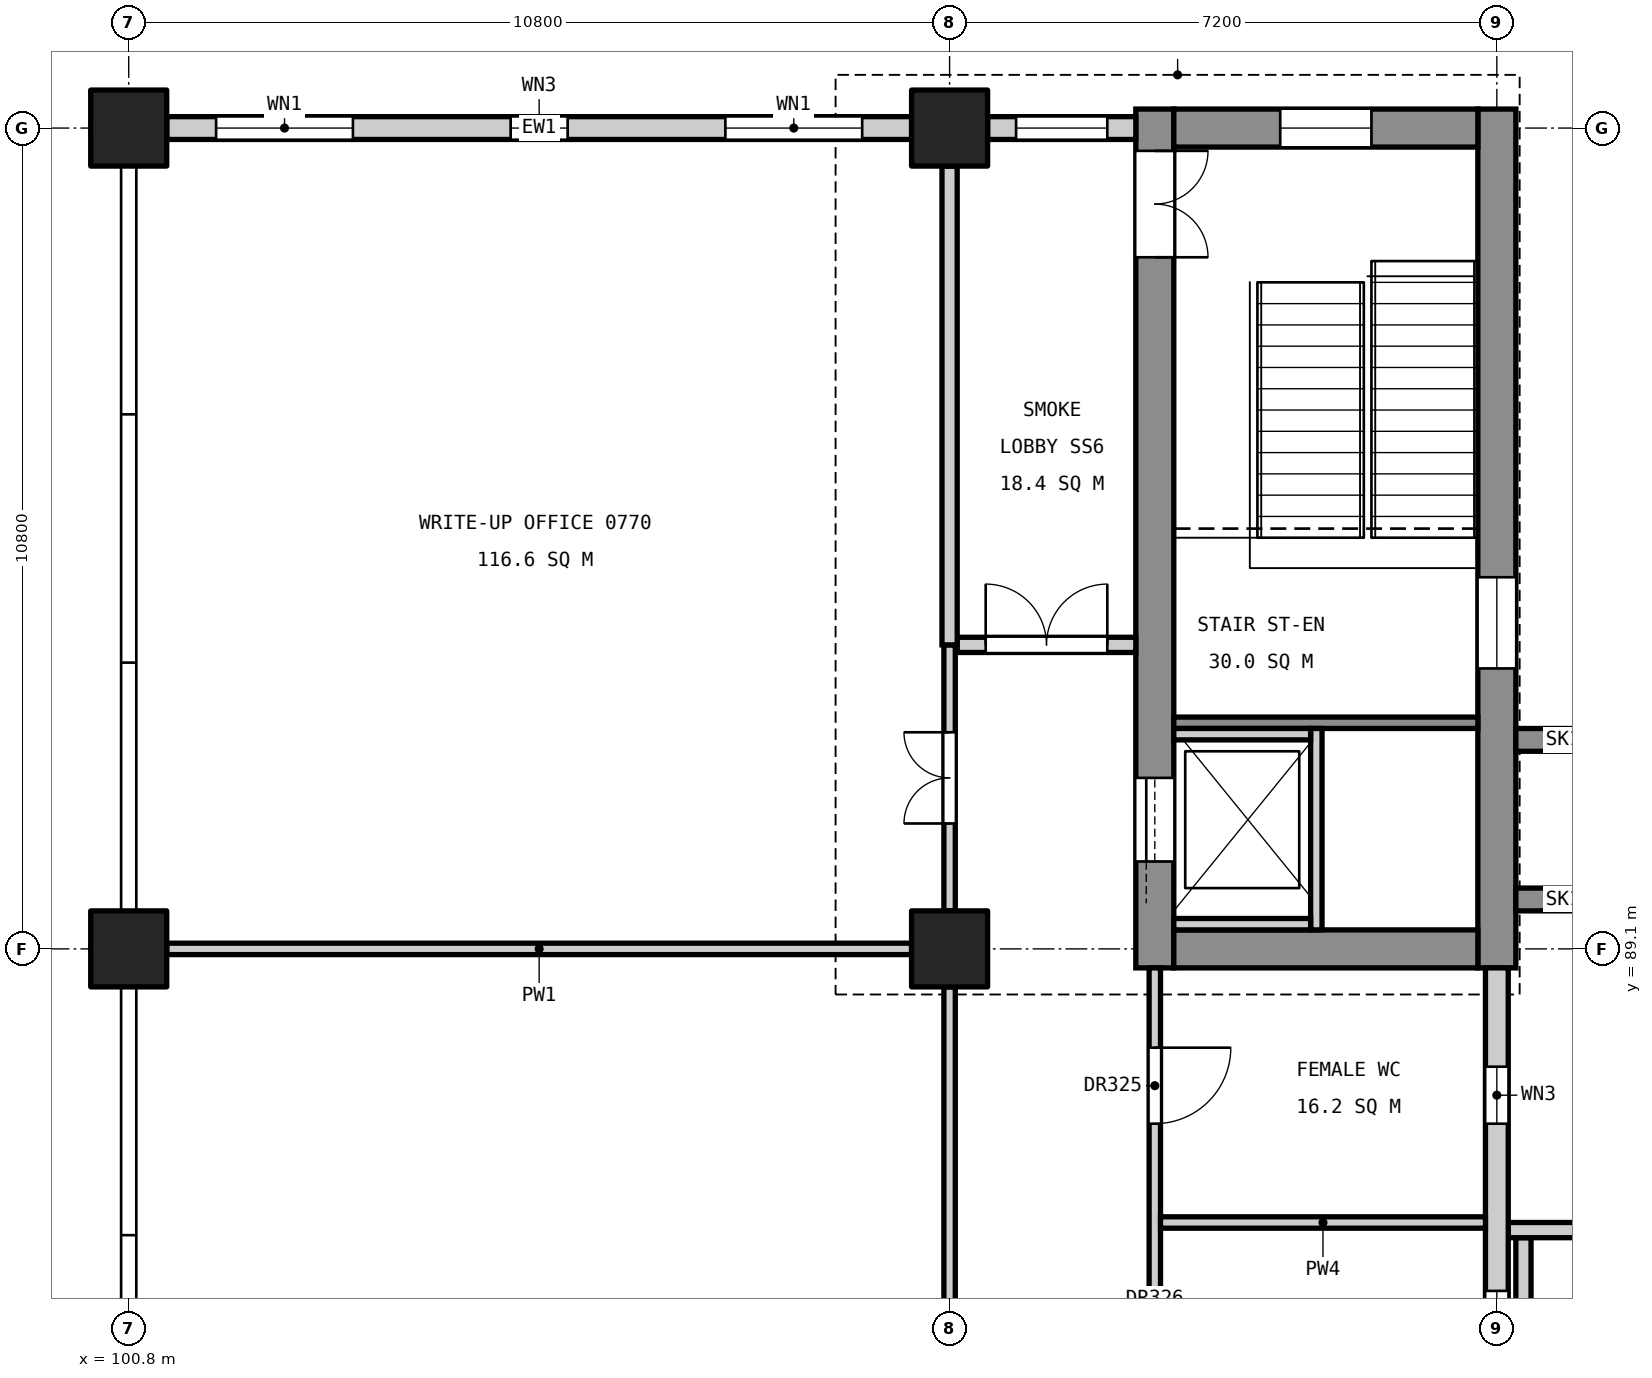
"""IFC4 building model, lengths in metres.
Left out: names, types, materials, properties, quantities, classifications, styles, units other than length and angle.
Written with IfcOpenShell. Run it as: python <this file> out.ifc"""

import sys

from ifc_helpers import new_model, si_unit, direction, frame, frame_2d, origin, origin_2d, place, context, subcontext, project, spatial, rectangle, extrude, element, fill, save


model = new_model("IFC4")
c1 = context("Model", 3, precision=1e-05, world=origin(), true_north=direction((0.0, 1.0)))
c2 = subcontext(c1, "Body", "Model", "MODEL_VIEW")
j1 = project(units=[si_unit("LENGTHUNIT", "METRE"), si_unit("PLANEANGLEUNIT", "RADIAN")], contexts=[c1])
p1 = place(None, origin())
s1 = spatial("IfcSite", under=j1, at=p1, CompositionType="ELEMENT")
p2 = place(p1, origin())
s2 = spatial("IfcBuilding", under=s1, at=p2, CompositionType="ELEMENT")
p3 = place(p2, frame((0.0, 0.0, 36.6)))
s3 = spatial("IfcBuildingStorey", under=s2, at=p3, CompositionType="ELEMENT", Elevation=36.6)
for number, where, z_axis, x_axis in (
    (1, (111.6, 89.1, 0.0), (0.0, 0.0, 1.0), (1.0, 0.0, 0.0)),
    (2, (111.6, 99.9, 0.0), (0.0, 0.0, 1.0), (1.0, 0.0, 0.0)),
    (3, (100.8, 89.1, 0.0), (0.0, 0.0, 1.0), (1.0, 0.0, 0.0)),
    (4, (100.8, 99.9, 0.0), (0.0, 0.0, 1.0), (1.0, 0.0, 0.0)),
):
    element("IfcColumn", number, at=place(p3, frame(where, z_axis=z_axis, x_axis=x_axis)), inside=s3, PredefinedType="COLUMN", context=c2, shape_type="SweptSolid", body=[
        extrude(rectangle(XDim=1.0, YDim=1.0, at=origin_2d()), origin(), (0.0, 0.0, 1.0), 4.8),
    ])
p4 = place(p3, frame((118.8, 88.85, 0.0), z_axis=(0.0, 0.0, 1.0), x_axis=(0.0, 1.0, 0.0)))
e5 = element("IfcWall", 5, at=p4, inside=s3, PredefinedType="SHEAR", context=c2, shape_type="SweptSolid", body=[
    extrude(rectangle(XDim=11.3, YDim=0.5, at=frame_2d((5.65, 0.0))), origin(), (0.0, 0.0, 1.0), 4.55),
])
p5 = place(p4, frame((3.94, 0.0, 3.4)))
e6 = element("IfcOpeningElement", 6, at=p5, cuts=e5, PredefinedType="OPENING", context=c2, shape_type="SweptSolid", body=[
    extrude(rectangle(XDim=1.2, YDim=0.9, at=frame_2d((0.6, 0.45))), frame((0.0, 0.26, 0.0), z_axis=(0.0, -1.0, 0.0), x_axis=(1.0, 0.0, 0.0)), (0.0, 0.0, 1.0), 0.52),
])
p6 = place(p3, frame((114.3, 88.85, 0.0), z_axis=(0.0, 0.0, 1.0), x_axis=(0.0, 1.0, 0.0)))
e7 = element("IfcWall", 7, at=p6, inside=s3, PredefinedType="SHEAR", context=c2, shape_type="SweptSolid", body=[
    extrude(rectangle(XDim=11.3, YDim=0.5, at=frame_2d((5.65, 0.0))), origin(), (0.0, 0.0, 1.0), 4.55),
])
p7 = place(p6, frame((9.35, 0.0, 0.0)))
e8 = element("IfcOpeningElement", 8, at=p7, cuts=e7, PredefinedType="OPENING", context=c2, shape_type="SweptSolid", body=[
    extrude(rectangle(XDim=1.4, YDim=2.1, at=frame_2d((0.7, 1.05))), frame((0.0, 0.26, 0.0), z_axis=(0.0, -1.0, 0.0), x_axis=(1.0, 0.0, 0.0)), (0.0, 0.0, 1.0), 0.52),
])
p8 = place(p6, frame((1.4, 0.0, 0.0)))
e9 = element("IfcOpeningElement", 9, at=p8, cuts=e7, PredefinedType="OPENING", context=c2, shape_type="SweptSolid", body=[
    extrude(rectangle(XDim=1.1, YDim=2.1, at=frame_2d((0.55, 1.05))), frame((0.0, 0.26, 0.0), z_axis=(0.0, -1.0, 0.0), x_axis=(1.0, 0.0, 0.0)), (0.0, 0.0, 1.0), 0.52),
])
p9 = place(p3, frame((118.55, 89.1, 0.0), z_axis=(0.0, 0.0, 1.0), x_axis=(-1.0, 0.0, 0.0)))
e10 = element("IfcWall", 10, at=p9, inside=s3, PredefinedType="SHEAR", context=c2, shape_type="SweptSolid", body=[
    extrude(rectangle(XDim=4.0, YDim=0.5, at=frame_2d((2.0, 0.0))), origin(), (0.0, 0.0, 1.0), 4.55),
])
p10 = place(p3, frame((118.55, 99.9, 0.0), z_axis=(0.0, 0.0, 1.0), x_axis=(-1.0, 0.0, 0.0)))
e11 = element("IfcWall", 11, at=p10, inside=s3, PredefinedType="SHEAR", context=c2, shape_type="SweptSolid", body=[
    extrude(rectangle(XDim=4.0, YDim=0.5, at=frame_2d((2.0, 0.0))), origin(), (0.0, 0.0, 1.0), 4.55),
])
p11 = place(p10, frame((1.4, 0.0, 3.4)))
e12 = element("IfcOpeningElement", 12, at=p11, cuts=e11, PredefinedType="OPENING", context=c2, shape_type="SweptSolid", body=[
    extrude(rectangle(XDim=1.2, YDim=0.9, at=frame_2d((0.6, 0.45))), frame((0.0, 0.26, 0.0), z_axis=(0.0, -1.0, 0.0), x_axis=(1.0, 0.0, 0.0)), (0.0, 0.0, 1.0), 0.52),
])
for number, where, z_axis, x_axis in (
    (13, (119.05, 89.75, 0.0), (0.0, 0.0, 1.0), (1.0, 0.0, 0.0)),
    (14, (119.05, 91.85, 0.0), (0.0, 0.0, 1.0), (1.0, 0.0, 0.0)),
):
    element("IfcWall", number, at=place(p3, frame(where, z_axis=z_axis, x_axis=x_axis)), inside=s3, PredefinedType="SHEAR", context=c2, shape_type="SweptSolid", body=[
        extrude(rectangle(XDim=1.25, YDim=0.3, at=frame_2d((0.625, 0.0))), origin(), (0.0, 0.0, 1.0), 4.8),
    ])
p12 = place(p3, frame((118.55, 92.075, 0.0), z_axis=(0.0, 0.0, 1.0), x_axis=(-1.0, 0.0, 0.0)))
e15 = element("IfcWall", 15, at=p12, inside=s3, PredefinedType="SOLIDWALL", context=c2, shape_type="SweptSolid", body=[
    extrude(rectangle(XDim=4.0, YDim=0.15, at=frame_2d((2.0, 0.0))), origin(), (0.0, 0.0, 1.0), 4.55),
])
p13 = place(p3, frame((116.425, 92.0, 0.0), z_axis=(0.0, 0.0, 1.0), x_axis=(0.0, -1.0, 0.0)))
e16 = element("IfcWall", 16, at=p13, inside=s3, PredefinedType="SOLIDWALL", context=c2, shape_type="SweptSolid", body=[
    extrude(rectangle(XDim=2.65, YDim=0.15, at=frame_2d((1.325, 0.0))), origin(), (0.0, 0.0, 1.0), 4.8),
])
for number, where, z_axis, x_axis in (
    (17, (116.35, 91.925, 0.0), (0.0, 0.0, 1.0), (-1.0, 0.0, 0.0)),
    (18, (116.35, 89.425, 0.0), (0.0, 0.0, 1.0), (-1.0, 0.0, 0.0)),
):
    element("IfcWall", number, at=place(p3, frame(where, z_axis=z_axis, x_axis=x_axis)), inside=s3, PredefinedType="SOLIDWALL", context=c2, shape_type="SweptSolid", body=[
        extrude(rectangle(XDim=1.8, YDim=0.15, at=frame_2d((0.9, 0.0))), origin(), (0.0, 0.0, 1.0), 4.8),
    ])
p14 = place(p3, frame((119.15, 78.5, 0.0), z_axis=(0.0, 0.0, 1.0), x_axis=(0.0, 1.0, 0.0)))
e19 = element("IfcWall", 19, at=p14, inside=s3, PredefinedType="PARAPET", context=c2, shape_type="SweptSolid", body=[
    extrude(rectangle(XDim=6.8, YDim=0.2, at=frame_2d((3.4, 0.0))), origin(), (0.0, 0.0, 1.0), 1.2),
])
p15 = place(p3, frame((118.95, 85.4, 0.0), z_axis=(0.0, 0.0, 1.0), x_axis=(1.0, 0.0, 0.0)))
e20 = element("IfcWall", 20, at=p15, inside=s3, PredefinedType="PARAPET", context=c2, shape_type="SweptSolid", body=[
    extrude(rectangle(XDim=4.65, YDim=0.2, at=frame_2d((2.325, 0.0))), origin(), (0.0, 0.0, 1.0), 1.2),
])
p16 = place(p3, frame((118.8, 78.8, 0.0), z_axis=(0.0, 0.0, 1.0), x_axis=(0.0, 1.0, 0.0)))
e21 = element("IfcWall", 21, at=p16, inside=s3, PredefinedType="STANDARD", context=c2, shape_type="SweptSolid", body=[
    extrude(rectangle(XDim=10.05, YDim=0.3, at=frame_2d((5.025, 0.0))), origin(), (0.0, 0.0, 1.0), 3.65),
])
p17 = place(p16, frame((0.65, 0.0, 0.9)))
e22 = element("IfcOpeningElement", 22, at=p17, cuts=e21, PredefinedType="OPENING", context=c2, shape_type="SweptSolid", body=[
    extrude(rectangle(XDim=1.8, YDim=2.4, at=frame_2d((0.9, 1.2))), frame((0.0, 0.16, 0.0), z_axis=(0.0, -1.0, 0.0), x_axis=(1.0, 0.0, 0.0)), (0.0, 0.0, 1.0), 0.32),
])
p18 = place(p16, frame((4.0, 0.0, 0.9)))
e23 = element("IfcOpeningElement", 23, at=p18, cuts=e21, PredefinedType="OPENING", context=c2, shape_type="SweptSolid", body=[
    extrude(rectangle(XDim=1.8, YDim=2.4, at=frame_2d((0.9, 1.2))), frame((0.0, 0.16, 0.0), z_axis=(0.0, -1.0, 0.0), x_axis=(1.0, 0.0, 0.0)), (0.0, 0.0, 1.0), 0.32),
])
p19 = place(p16, frame((8.0, 0.0, 0.8)))
e24 = element("IfcOpeningElement", 24, at=p19, cuts=e21, PredefinedType="OPENING", context=c2, shape_type="SweptSolid", body=[
    extrude(rectangle(XDim=0.75, YDim=1.2, at=frame_2d((0.375, 0.6))), frame((0.0, 0.16, 0.0), z_axis=(0.0, -1.0, 0.0), x_axis=(1.0, 0.0, 0.0)), (0.0, 0.0, 1.0), 0.32),
])
p20 = place(p3, frame((114.05, 99.9, 0.0), z_axis=(0.0, 0.0, 1.0), x_axis=(-1.0, 0.0, 0.0)))
e25 = element("IfcWall", 25, at=p20, inside=s3, PredefinedType="STANDARD", context=c2, shape_type="SweptSolid", body=[
    extrude(rectangle(XDim=1.95, YDim=0.3, at=frame_2d((0.975, 0.0))), origin(), (0.0, 0.0, 1.0), 3.85),
])
p21 = place(p20, frame((0.375, 0.0, 0.9)))
e26 = element("IfcOpeningElement", 26, at=p21, cuts=e25, PredefinedType="OPENING", context=c2, shape_type="SweptSolid", body=[
    extrude(rectangle(XDim=1.2, YDim=2.4, at=frame_2d((0.6, 1.2))), frame((0.0, 0.16, 0.0), z_axis=(0.0, -1.0, 0.0), x_axis=(1.0, 0.0, 0.0)), (0.0, 0.0, 1.0), 0.32),
])
p22 = place(p3, frame((111.1, 99.9, 0.0), z_axis=(0.0, 0.0, 1.0), x_axis=(-1.0, 0.0, 0.0)))
e27 = element("IfcWall", 27, at=p22, inside=s3, PredefinedType="STANDARD", context=c2, shape_type="SweptSolid", body=[
    extrude(rectangle(XDim=9.8, YDim=0.3, at=frame_2d((4.9, 0.0))), origin(), (0.0, 0.0, 1.0), 3.85),
])
p23 = place(p22, frame((0.65, 0.0, 0.9)))
e28 = element("IfcOpeningElement", 28, at=p23, cuts=e27, PredefinedType="OPENING", context=c2, shape_type="SweptSolid", body=[
    extrude(rectangle(XDim=1.8, YDim=2.4, at=frame_2d((0.9, 1.2))), frame((0.0, 0.16, 0.0), z_axis=(0.0, -1.0, 0.0), x_axis=(1.0, 0.0, 0.0)), (0.0, 0.0, 1.0), 0.32),
])
p24 = place(p22, frame((4.525, 0.0, 0.8)))
e29 = element("IfcOpeningElement", 29, at=p24, cuts=e27, PredefinedType="OPENING", context=c2, shape_type="SweptSolid", body=[
    extrude(rectangle(XDim=0.75, YDim=1.2, at=frame_2d((0.375, 0.6))), frame((0.0, 0.16, 0.0), z_axis=(0.0, -1.0, 0.0), x_axis=(1.0, 0.0, 0.0)), (0.0, 0.0, 1.0), 0.32),
])
p25 = place(p22, frame((7.35, 0.0, 0.9)))
e30 = element("IfcOpeningElement", 30, at=p25, cuts=e27, PredefinedType="OPENING", context=c2, shape_type="SweptSolid", body=[
    extrude(rectangle(XDim=1.8, YDim=2.4, at=frame_2d((0.9, 1.2))), frame((0.0, 0.16, 0.0), z_axis=(0.0, -1.0, 0.0), x_axis=(1.0, 0.0, 0.0)), (0.0, 0.0, 1.0), 0.32),
])
p26 = place(p3, frame((114.3, 78.45, 0.0), z_axis=(0.0, 0.0, 1.0), x_axis=(0.0, 1.0, 0.0)))
e31 = element("IfcWall", 31, at=p26, inside=s3, PredefinedType="PARTITIONING", context=c2, shape_type="SweptSolid", body=[
    extrude(rectangle(XDim=10.4, YDim=0.15, at=frame_2d((5.2, 0.0))), origin(), (0.0, 0.0, 1.0), 3.55),
])
p27 = place(p26, frame((8.35, 0.0, 0.0)))
e32 = element("IfcOpeningElement", 32, at=p27, cuts=e31, PredefinedType="OPENING", context=c2, shape_type="SweptSolid", body=[
    extrude(rectangle(XDim=1.0, YDim=2.1, at=frame_2d((0.5, 1.05))), frame((0.0, 0.085, 0.0), z_axis=(0.0, -1.0, 0.0), x_axis=(1.0, 0.0, 0.0)), (0.0, 0.0, 1.0), 0.17),
])
p28 = place(p26, frame((4.75, 0.0, 0.0)))
e33 = element("IfcOpeningElement", 33, at=p28, cuts=e31, PredefinedType="OPENING", context=c2, shape_type="SweptSolid", body=[
    extrude(rectangle(XDim=1.0, YDim=2.1, at=frame_2d((0.5, 1.05))), frame((0.0, 0.085, 0.0), z_axis=(0.0, -1.0, 0.0), x_axis=(1.0, 0.0, 0.0)), (0.0, 0.0, 1.0), 0.17),
])
p29 = place(p26, frame((1.15, 0.0, 0.0)))
e34 = element("IfcOpeningElement", 34, at=p29, cuts=e31, PredefinedType="OPENING", context=c2, shape_type="SweptSolid", body=[
    extrude(rectangle(XDim=1.0, YDim=2.1, at=frame_2d((0.5, 1.05))), frame((0.0, 0.085, 0.0), z_axis=(0.0, -1.0, 0.0), x_axis=(1.0, 0.0, 0.0)), (0.0, 0.0, 1.0), 0.17),
])
p30 = place(p3, frame((118.65, 85.5, 0.0), z_axis=(0.0, 0.0, 1.0), x_axis=(-1.0, 0.0, 0.0)))
e35 = element("IfcWall", 35, at=p30, inside=s3, PredefinedType="PARTITIONING", context=c2, shape_type="SweptSolid", body=[
    extrude(rectangle(XDim=4.275, YDim=0.15, at=frame_2d((2.137, 0.0))), origin(), (0.0, 0.0, 1.0), 3.85),
])
p31 = place(p3, frame((114.05, 93.1, 0.0), z_axis=(0.0, 0.0, 1.0), x_axis=(-1.0, 0.0, 0.0)))
e36 = element("IfcWall", 36, at=p31, inside=s3, PredefinedType="PARTITIONING", context=c2, shape_type="SweptSolid", body=[
    extrude(rectangle(XDim=2.35, YDim=0.2, at=frame_2d((1.175, 0.0))), origin(), (0.0, 0.0, 1.0), 3.55),
])
p32 = place(p31, frame((0.375, 0.0, 0.0)))
e37 = element("IfcOpeningElement", 37, at=p32, cuts=e36, PredefinedType="OPENING", context=c2, shape_type="SweptSolid", body=[
    extrude(rectangle(XDim=1.6, YDim=2.1, at=frame_2d((0.8, 1.05))), frame((0.0, 0.11, 0.0), z_axis=(0.0, -1.0, 0.0), x_axis=(1.0, 0.0, 0.0)), (0.0, 0.0, 1.0), 0.22),
])
p33 = place(p3, frame((111.6, 78.8, 0.0), z_axis=(0.0, 0.0, 1.0), x_axis=(0.0, 1.0, 0.0)))
e38 = element("IfcWall", 38, at=p33, inside=s3, PredefinedType="PARTITIONING", context=c2, shape_type="SweptSolid", body=[
    extrude(rectangle(XDim=9.8, YDim=0.15, at=frame_2d((4.9, 0.0))), origin(), (0.0, 0.0, 1.0), 3.55),
])
p34 = place(p33, frame((4.3, 0.0, 0.0)))
e39 = element("IfcOpeningElement", 39, at=p34, cuts=e38, PredefinedType="OPENING", context=c2, shape_type="SweptSolid", body=[
    extrude(rectangle(XDim=1.2, YDim=2.1, at=frame_2d((0.6, 1.05))), frame((0.0, 0.085, 0.0), z_axis=(0.0, -1.0, 0.0), x_axis=(1.0, 0.0, 0.0)), (0.0, 0.0, 1.0), 0.17),
])
p35 = place(p3, frame((111.6, 89.6, 0.0), z_axis=(0.0, 0.0, 1.0), x_axis=(0.0, 1.0, 0.0)))
e40 = element("IfcWall", 40, at=p35, inside=s3, PredefinedType="PARTITIONING", context=c2, shape_type="SweptSolid", body=[
    extrude(rectangle(XDim=3.5, YDim=0.15, at=frame_2d((1.75, 0.0))), origin(), (0.0, 0.0, 1.0), 3.55),
])
p36 = place(p35, frame((1.15, 0.0, 0.0)))
e41 = element("IfcOpeningElement", 41, at=p36, cuts=e40, PredefinedType="OPENING", context=c2, shape_type="SweptSolid", body=[
    extrude(rectangle(XDim=1.2, YDim=2.1, at=frame_2d((0.6, 1.05))), frame((0.0, 0.085, 0.0), z_axis=(0.0, -1.0, 0.0), x_axis=(1.0, 0.0, 0.0)), (0.0, 0.0, 1.0), 0.17),
])
p37 = place(p3, frame((111.6, 93.1, 0.0), z_axis=(0.0, 0.0, 1.0), x_axis=(0.0, 1.0, 0.0)))
e42 = element("IfcWall", 42, at=p37, inside=s3, PredefinedType="PARTITIONING", context=c2, shape_type="SweptSolid", body=[
    extrude(rectangle(XDim=6.3, YDim=0.2, at=frame_2d((3.15, 0.0))), origin(), (0.0, 0.0, 1.0), 3.55),
])
p38 = place(p3, frame((111.1, 89.1, 0.0), z_axis=(0.0, 0.0, 1.0), x_axis=(-1.0, 0.0, 0.0)))
e43 = element("IfcWall", 43, at=p38, inside=s3, PredefinedType="PARTITIONING", context=c2, shape_type="SweptSolid", body=[
    extrude(rectangle(XDim=9.8, YDim=0.15, at=frame_2d((4.9, 0.0))), origin(), (0.0, 0.0, 1.0), 3.85),
])
p39 = place(p7, frame((1.4, 0.0, 0.0), z_axis=(0.0, 0.0, 1.0), x_axis=(-1.0, 0.0, 0.0)))
e44 = element("IfcDoor", 44, at=p39, inside=s3, OperationType="DOUBLE_DOOR_SINGLE_SWING", PredefinedType="DOOR", context=c2, shape_type="SweptSolid", body=[
    extrude(rectangle(XDim=1.4, YDim=2.1, at=frame_2d((0.7, 1.05))), frame((0.0, 0.025, 0.0), z_axis=(0.0, -1.0, 0.0), x_axis=(1.0, 0.0, 0.0)), (0.0, 0.0, 1.0), 0.05),
])
fill(e8, e44)
p40 = place(p8, origin())
e45 = element("IfcDoor", 45, at=p40, inside=s3, OperationType="SLIDING_TO_LEFT", PredefinedType="DOOR", context=c2, shape_type="SweptSolid", body=[
    extrude(rectangle(XDim=1.1, YDim=2.1, at=frame_2d((0.55, 1.05))), frame((0.0, 0.025, 0.0), z_axis=(0.0, -1.0, 0.0), x_axis=(1.0, 0.0, 0.0)), (0.0, 0.0, 1.0), 0.05),
])
fill(e9, e45)
p41 = place(p18, origin())
e46 = element("IfcWindow", 46, at=p41, inside=s3, PartitioningType="SINGLE_PANEL", PredefinedType="WINDOW", context=c2, shape_type="SweptSolid", body=[
    extrude(rectangle(XDim=1.8, YDim=2.4, at=frame_2d((0.9, 1.2))), frame((0.0, 0.03, 0.0), z_axis=(0.0, -1.0, 0.0), x_axis=(1.0, 0.0, 0.0)), (0.0, 0.0, 1.0), 0.06),
])
fill(e23, e46)
p42 = place(p19, origin())
e47 = element("IfcWindow", 47, at=p42, inside=s3, PartitioningType="SINGLE_PANEL", PredefinedType="WINDOW", context=c2, shape_type="SweptSolid", body=[
    extrude(rectangle(XDim=0.75, YDim=1.2, at=frame_2d((0.375, 0.6))), frame((0.0, 0.03, 0.0), z_axis=(0.0, -1.0, 0.0), x_axis=(1.0, 0.0, 0.0)), (0.0, 0.0, 1.0), 0.06),
])
fill(e24, e47)
p43 = place(p21, origin())
e48 = element("IfcWindow", 48, at=p43, inside=s3, PartitioningType="SINGLE_PANEL", PredefinedType="WINDOW", context=c2, shape_type="SweptSolid", body=[
    extrude(rectangle(XDim=1.2, YDim=2.4, at=frame_2d((0.6, 1.2))), frame((0.0, 0.03, 0.0), z_axis=(0.0, -1.0, 0.0), x_axis=(1.0, 0.0, 0.0)), (0.0, 0.0, 1.0), 0.06),
])
fill(e26, e48)
p44 = place(p23, origin())
e49 = element("IfcWindow", 49, at=p44, inside=s3, PartitioningType="SINGLE_PANEL", PredefinedType="WINDOW", context=c2, shape_type="SweptSolid", body=[
    extrude(rectangle(XDim=1.8, YDim=2.4, at=frame_2d((0.9, 1.2))), frame((0.0, 0.03, 0.0), z_axis=(0.0, -1.0, 0.0), x_axis=(1.0, 0.0, 0.0)), (0.0, 0.0, 1.0), 0.06),
])
fill(e28, e49)
p45 = place(p24, origin())
e50 = element("IfcWindow", 50, at=p45, inside=s3, PartitioningType="SINGLE_PANEL", PredefinedType="WINDOW", context=c2, shape_type="SweptSolid", body=[
    extrude(rectangle(XDim=0.75, YDim=1.2, at=frame_2d((0.375, 0.6))), frame((0.0, 0.03, 0.0), z_axis=(0.0, -1.0, 0.0), x_axis=(1.0, 0.0, 0.0)), (0.0, 0.0, 1.0), 0.06),
])
fill(e29, e50)
p46 = place(p25, origin())
e51 = element("IfcWindow", 51, at=p46, inside=s3, PartitioningType="SINGLE_PANEL", PredefinedType="WINDOW", context=c2, shape_type="SweptSolid", body=[
    extrude(rectangle(XDim=1.8, YDim=2.4, at=frame_2d((0.9, 1.2))), frame((0.0, 0.03, 0.0), z_axis=(0.0, -1.0, 0.0), x_axis=(1.0, 0.0, 0.0)), (0.0, 0.0, 1.0), 0.06),
])
fill(e30, e51)
p47 = place(p5, origin())
e52 = element("IfcWindow", 52, at=p47, inside=s3, PartitioningType="SINGLE_PANEL", PredefinedType="WINDOW", context=c2, shape_type="SweptSolid", body=[
    extrude(rectangle(XDim=1.2, YDim=0.9, at=frame_2d((0.6, 0.45))), frame((0.0, 0.03, 0.0), z_axis=(0.0, -1.0, 0.0), x_axis=(1.0, 0.0, 0.0)), (0.0, 0.0, 1.0), 0.06),
])
fill(e6, e52)
p48 = place(p11, origin())
e53 = element("IfcWindow", 53, at=p48, inside=s3, PartitioningType="SINGLE_PANEL", PredefinedType="WINDOW", context=c2, shape_type="SweptSolid", body=[
    extrude(rectangle(XDim=1.2, YDim=0.9, at=frame_2d((0.6, 0.45))), frame((0.0, 0.03, 0.0), z_axis=(0.0, -1.0, 0.0), x_axis=(1.0, 0.0, 0.0)), (0.0, 0.0, 1.0), 0.06),
])
fill(e12, e53)
p49 = place(p27, frame((1.0, 0.0, 0.0), z_axis=(0.0, 0.0, 1.0), x_axis=(-1.0, 0.0, 0.0)))
e54 = element("IfcDoor", 54, at=p49, inside=s3, OperationType="SINGLE_SWING_LEFT", PredefinedType="DOOR", context=c2, shape_type="SweptSolid", body=[
    extrude(rectangle(XDim=1.0, YDim=2.1, at=frame_2d((0.5, 1.05))), frame((0.0, 0.025, 0.0), z_axis=(0.0, -1.0, 0.0), x_axis=(1.0, 0.0, 0.0)), (0.0, 0.0, 1.0), 0.05),
])
fill(e32, e54)
p50 = place(p36, origin())
e55 = element("IfcDoor", 55, at=p50, inside=s3, OperationType="DOUBLE_DOOR_SINGLE_SWING", PredefinedType="DOOR", context=c2, shape_type="SweptSolid", body=[
    extrude(rectangle(XDim=1.2, YDim=2.1, at=frame_2d((0.6, 1.05))), frame((0.0, 0.025, 0.0), z_axis=(0.0, -1.0, 0.0), x_axis=(1.0, 0.0, 0.0)), (0.0, 0.0, 1.0), 0.05),
])
fill(e41, e55)
p51 = place(p32, frame((1.6, 0.0, 0.0), z_axis=(0.0, 0.0, 1.0), x_axis=(-1.0, 0.0, 0.0)))
e56 = element("IfcDoor", 56, at=p51, inside=s3, OperationType="DOUBLE_DOOR_SINGLE_SWING", PredefinedType="DOOR", context=c2, shape_type="SweptSolid", body=[
    extrude(rectangle(XDim=1.6, YDim=2.1, at=frame_2d((0.8, 1.05))), frame((0.0, 0.025, 0.0), z_axis=(0.0, -1.0, 0.0), x_axis=(1.0, 0.0, 0.0)), (0.0, 0.0, 1.0), 0.05),
])
fill(e37, e56)
save(model, sys.argv[1])
